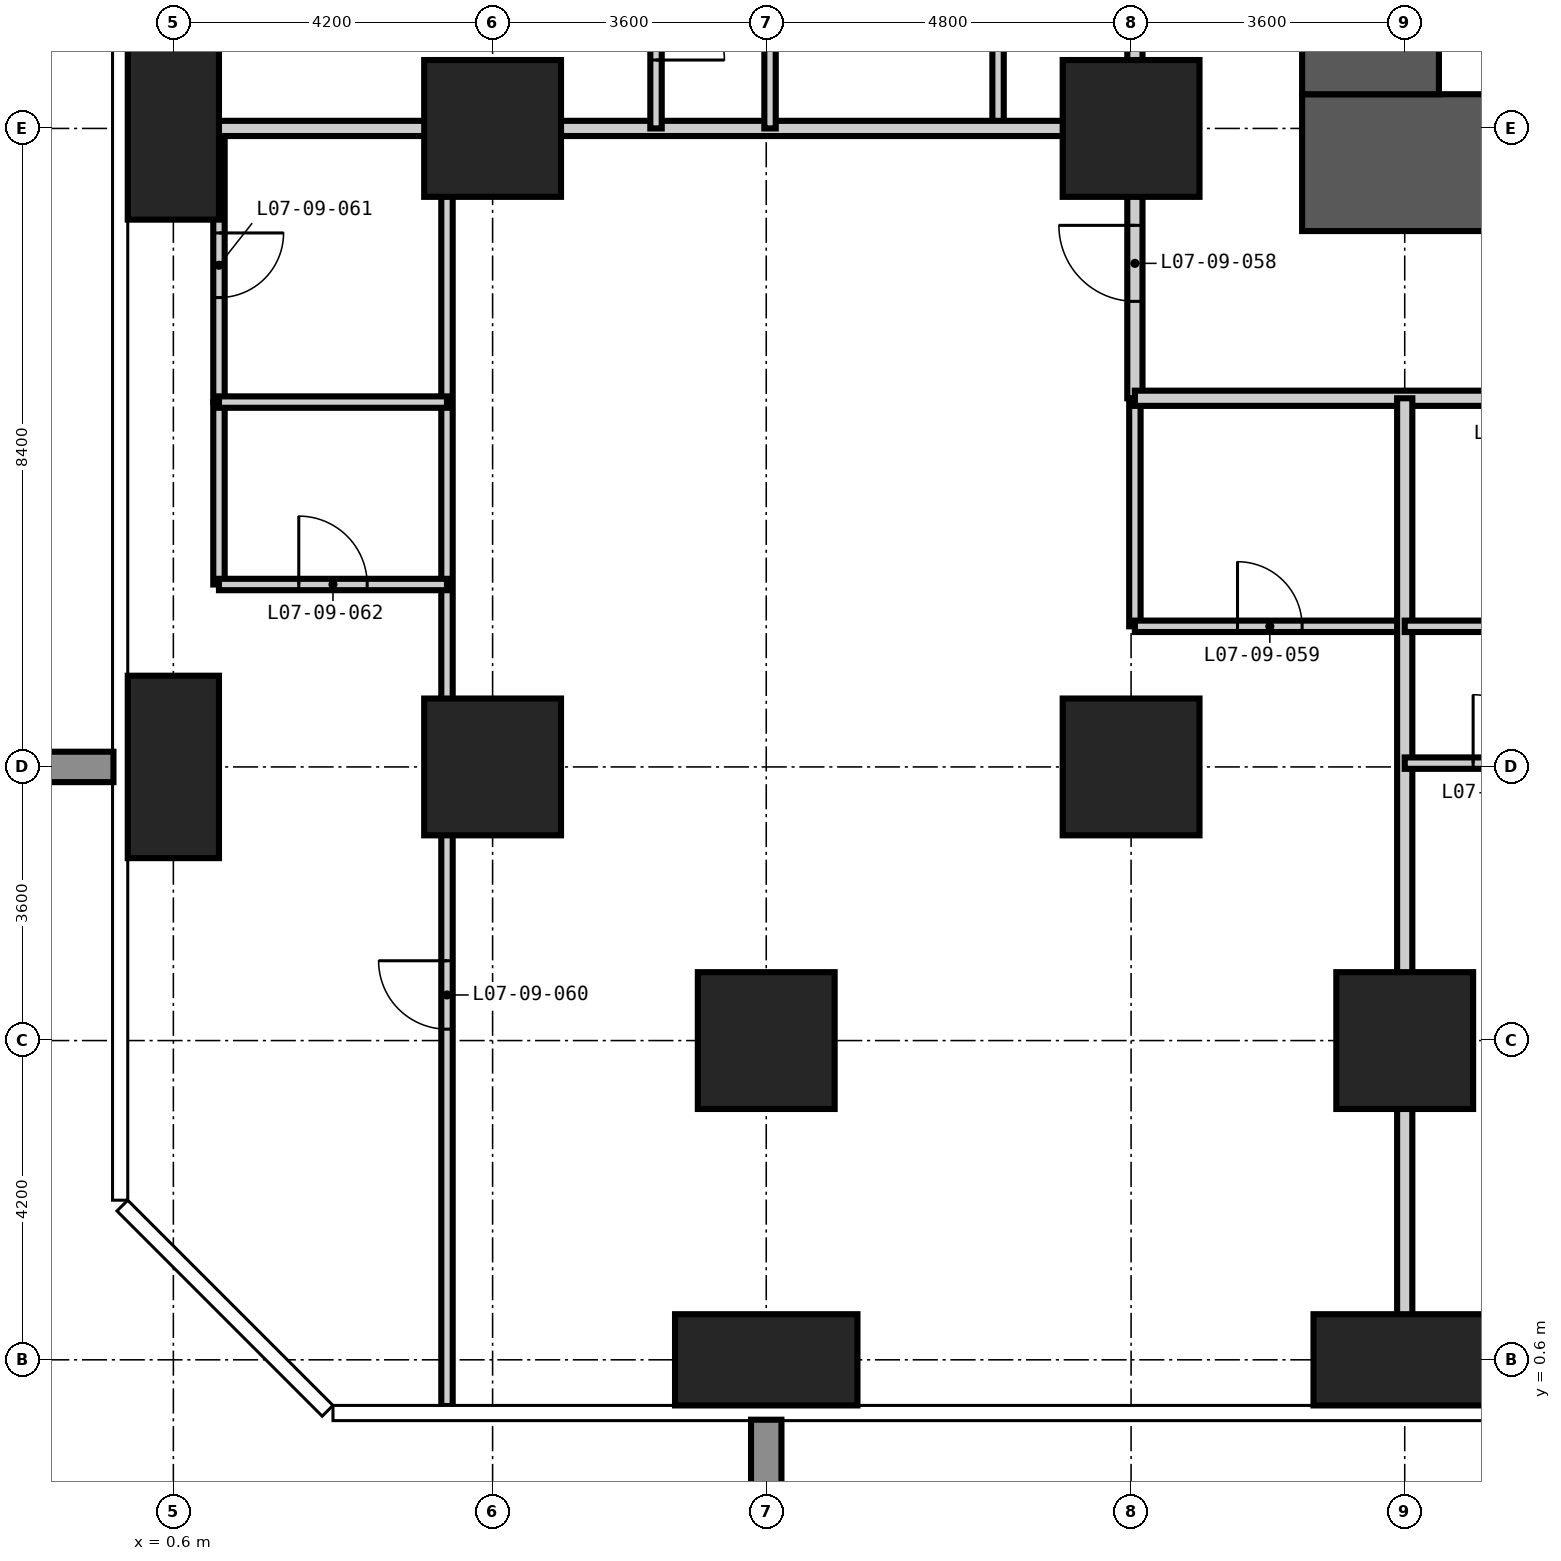
"""IFC4 building model, lengths in metres.
Left out: names, types, materials, properties, quantities, classifications, styles, units other than length and angle.
Written with IfcOpenShell. Run it as: python <this file> out.ifc"""

import sys

from ifc_helpers import new_model, si_unit, direction, frame, frame_2d, origin, origin_2d, place, context, subcontext, project, spatial, rectangle, extrude, element, fill, save


model = new_model("IFC4")
c1 = context("Model", 3, precision=1e-05, world=origin(), true_north=direction((0.0, 1.0)))
c2 = subcontext(c1, "Body", "Model", "MODEL_VIEW")
j1 = project(units=[si_unit("LENGTHUNIT", "METRE"), si_unit("PLANEANGLEUNIT", "RADIAN")], contexts=[c1])
p1 = place(None, origin())
s1 = spatial("IfcSite", under=j1, at=p1, CompositionType="ELEMENT")
p2 = place(p1, origin())
s2 = spatial("IfcBuilding", under=s1, at=p2, CompositionType="ELEMENT")
p3 = place(p2, frame((0.0, 0.0, 34.2)))
s3 = spatial("IfcBuildingStorey", under=s2, at=p3, CompositionType="ELEMENT", Elevation=34.2)
for number, where, z_axis, x_axis in (
    (1, (0.6, 8.4, -0.35), (0.0, 0.0, 1.0), (1.0, 0.0, 0.0)),
    (2, (0.6, 16.8, -0.35), (0.0, 0.0, 1.0), (1.0, 0.0, 0.0)),
):
    element("IfcColumn", number, at=place(p3, frame(where, z_axis=z_axis, x_axis=x_axis)), inside=s3, PredefinedType="COLUMN", context=c2, shape_type="SweptSolid", body=[
        extrude(rectangle(XDim=1.2, YDim=2.4, at=origin_2d()), origin(), (0.0, 0.0, 1.0), 3.6),
    ])
for number, where, z_axis, x_axis in (
    (3, (4.8, 8.4, -0.35), (0.0, 0.0, 1.0), (1.0, 0.0, 0.0)),
    (4, (4.8, 16.8, -0.35), (0.0, 0.0, 1.0), (1.0, 0.0, 0.0)),
):
    element("IfcColumn", number, at=place(p3, frame(where, z_axis=z_axis, x_axis=x_axis)), inside=s3, PredefinedType="COLUMN", context=c2, shape_type="SweptSolid", body=[
        extrude(rectangle(XDim=1.8, YDim=1.8, at=origin_2d()), origin(), (0.0, 0.0, 1.0), 3.6),
    ])
p4 = place(p3, frame((8.4, 0.6, -0.35), z_axis=(0.0, 0.0, 1.0), x_axis=(1.0, 0.0, 0.0)))
e5 = element("IfcColumn", 5, at=p4, inside=s3, PredefinedType="COLUMN", context=c2, shape_type="SweptSolid", body=[
    extrude(rectangle(XDim=2.4, YDim=1.2, at=origin_2d()), origin(), (0.0, 0.0, 1.0), 3.6),
])
for number, where, z_axis, x_axis in (
    (6, (8.4, 4.8, -0.35), (0.0, 0.0, 1.0), (1.0, 0.0, 0.0)),
    (7, (13.2, 8.4, -0.35), (0.0, 0.0, 1.0), (1.0, 0.0, 0.0)),
    (8, (13.2, 16.8, -0.35), (0.0, 0.0, 1.0), (1.0, 0.0, 0.0)),
):
    element("IfcColumn", number, at=place(p3, frame(where, z_axis=z_axis, x_axis=x_axis)), inside=s3, PredefinedType="COLUMN", context=c2, shape_type="SweptSolid", body=[
        extrude(rectangle(XDim=1.8, YDim=1.8, at=origin_2d()), origin(), (0.0, 0.0, 1.0), 3.6),
    ])
p5 = place(p3, frame((16.8, 0.6, -0.35), z_axis=(0.0, 0.0, 1.0), x_axis=(1.0, 0.0, 0.0)))
e9 = element("IfcColumn", 9, at=p5, inside=s3, PredefinedType="COLUMN", context=c2, shape_type="SweptSolid", body=[
    extrude(rectangle(XDim=2.4, YDim=1.2, at=origin_2d()), origin(), (0.0, 0.0, 1.0), 3.6),
])
p6 = place(p3, frame((16.8, 4.8, -0.35), z_axis=(0.0, 0.0, 1.0), x_axis=(1.0, 0.0, 0.0)))
e10 = element("IfcColumn", 10, at=p6, inside=s3, PredefinedType="COLUMN", context=c2, shape_type="SweptSolid", body=[
    extrude(rectangle(XDim=1.8, YDim=1.8, at=origin_2d()), origin(), (0.0, 0.0, 1.0), 3.6),
])
p7 = place(p3, frame((15.45, 16.35, -0.35), z_axis=(0.0, 0.0, 1.0), x_axis=(1.0, 0.0, 0.0)))
e11 = element("IfcWall", 11, at=p7, inside=s3, PredefinedType="SHEAR", context=c2, shape_type="SweptSolid", body=[
    extrude(rectangle(XDim=27.9, YDim=1.8, at=frame_2d((13.95, 0.0))), origin(), (0.0, 0.0, 1.0), 3.6),
])
p8 = place(p7, frame((13.45, 0.0, 0.35)))
e12 = element("IfcOpeningElement", 12, at=p8, cuts=e11, PredefinedType="OPENING", context=c2, shape_type="SweptSolid", body=[
    extrude(rectangle(XDim=1.0, YDim=2.1, at=frame_2d((0.5, 1.05))), frame((0.0, 0.91, 0.0), z_axis=(0.0, -1.0, 0.0), x_axis=(1.0, 0.0, 0.0)), (0.0, 0.0, 1.0), 1.82),
])
p9 = place(p7, frame((19.75, 0.0, 0.35)))
e13 = element("IfcOpeningElement", 13, at=p9, cuts=e11, PredefinedType="OPENING", context=c2, shape_type="SweptSolid", body=[
    extrude(rectangle(XDim=1.0, YDim=2.1, at=frame_2d((0.5, 1.05))), frame((0.0, 0.91, 0.0), z_axis=(0.0, -1.0, 0.0), x_axis=(1.0, 0.0, 0.0)), (0.0, 0.0, 1.0), 1.82),
])
p10 = place(p3, frame((16.35, 41.55, -0.35), z_axis=(0.0, 0.0, 1.0), x_axis=(0.0, -1.0, 0.0)))
e14 = element("IfcWall", 14, at=p10, inside=s3, PredefinedType="SHEAR", context=c2, shape_type="SweptSolid", body=[
    extrude(rectangle(XDim=24.3, YDim=1.8, at=frame_2d((12.15, 0.0))), origin(), (0.0, 0.0, 1.0), 3.6),
])
p11 = place(p10, frame((11.25, 0.0, 0.35)))
e15 = element("IfcOpeningElement", 15, at=p11, cuts=e14, PredefinedType="OPENING", context=c2, shape_type="SweptSolid", body=[
    extrude(rectangle(XDim=1.8, YDim=2.2, at=frame_2d((0.9, 1.1))), frame((0.0, 0.91, 0.0), z_axis=(0.0, -1.0, 0.0), x_axis=(1.0, 0.0, 0.0)), (0.0, 0.0, 1.0), 1.82),
])
p12 = place(p10, frame((20.05, 0.0, 0.35)))
e16 = element("IfcOpeningElement", 16, at=p12, cuts=e14, PredefinedType="OPENING", context=c2, shape_type="SweptSolid", body=[
    extrude(rectangle(XDim=1.0, YDim=2.1, at=frame_2d((0.5, 1.05))), frame((0.0, 0.91, 0.0), z_axis=(0.0, -1.0, 0.0), x_axis=(1.0, 0.0, 0.0)), (0.0, 0.0, 1.0), 1.82),
])
p13 = place(p10, frame((5.35, 0.0, 0.35)))
e17 = element("IfcOpeningElement", 17, at=p13, cuts=e14, PredefinedType="OPENING", context=c2, shape_type="SweptSolid", body=[
    extrude(rectangle(XDim=1.0, YDim=2.1, at=frame_2d((0.5, 1.05))), frame((0.0, 0.91, 0.0), z_axis=(0.0, -1.0, 0.0), x_axis=(1.0, 0.0, 0.0)), (0.0, 0.0, 1.0), 1.82),
])
p14 = place(p3, frame((1.2, 13.2, 0.0), z_axis=(0.0, 0.0, 1.0), x_axis=(0.0, 1.0, 0.0)))
e18 = element("IfcWall", 18, at=p14, inside=s3, PredefinedType="PARTITIONING", context=c2, shape_type="SweptSolid", body=[
    extrude(rectangle(XDim=3.6, YDim=0.15, at=frame_2d((1.8, 0.0))), origin(), (0.0, 0.0, 1.0), 3.25),
])
p15 = place(p14, frame((1.375, 0.0, 0.0)))
e19 = element("IfcOpeningElement", 19, at=p15, cuts=e18, PredefinedType="OPENING", context=c2, shape_type="SweptSolid", body=[
    extrude(rectangle(XDim=0.85, YDim=2.1, at=frame_2d((0.425, 1.05))), frame((0.0, 0.085, 0.0), z_axis=(0.0, -1.0, 0.0), x_axis=(1.0, 0.0, 0.0)), (0.0, 0.0, 1.0), 0.17),
])
p16 = place(p3, frame((11.45, 16.8, 0.0), z_axis=(0.0, 0.0, 1.0), x_axis=(0.0, 1.0, 0.0)))
e20 = element("IfcWall", 20, at=p16, inside=s3, PredefinedType="PARTITIONING", context=c2, shape_type="SweptSolid", body=[
    extrude(rectangle(XDim=2.7, YDim=0.15, at=frame_2d((1.35, 0.0))), origin(), (0.0, 0.0, 1.0), 3.25),
])
p17 = place(p3, frame((13.25, 10.25, 0.0), z_axis=(0.0, 0.0, 1.0), x_axis=(0.0, 1.0, 0.0)))
e21 = element("IfcWall", 21, at=p17, inside=s3, PredefinedType="PARTITIONING", context=c2, shape_type="SweptSolid", body=[
    extrude(rectangle(XDim=3.0, YDim=0.15, at=frame_2d((1.5, 0.0))), origin(), (0.0, 0.0, 1.0), 3.25),
])
p18 = place(p3, frame((13.25, 10.25, 0.0), z_axis=(0.0, 0.0, 1.0), x_axis=(1.0, 0.0, 0.0)))
e22 = element("IfcWall", 22, at=p18, inside=s3, PredefinedType="PARTITIONING", context=c2, shape_type="SweptSolid", body=[
    extrude(rectangle(XDim=3.55, YDim=0.15, at=frame_2d((1.775, 0.0))), origin(), (0.0, 0.0, 1.0), 3.25),
])
p19 = place(p18, frame((1.35, 0.0, 0.0)))
e23 = element("IfcOpeningElement", 23, at=p19, cuts=e22, PredefinedType="OPENING", context=c2, shape_type="SweptSolid", body=[
    extrude(rectangle(XDim=0.85, YDim=2.1, at=frame_2d((0.425, 1.05))), frame((0.0, 0.085, 0.0), z_axis=(0.0, -1.0, 0.0), x_axis=(1.0, 0.0, 0.0)), (0.0, 0.0, 1.0), 0.17),
])
p20 = place(p3, frame((13.25, 13.25, 0.0), z_axis=(0.0, 0.0, 1.0), x_axis=(0.0, 1.0, 0.0)))
e24 = element("IfcWall", 24, at=p20, inside=s3, PredefinedType="PARTITIONING", context=c2, shape_type="SweptSolid", body=[
    extrude(rectangle(XDim=32.0, YDim=0.2, at=frame_2d((16.0, 0.0))), origin(), (0.0, 0.0, 1.0), 3.25),
])
p21 = place(p20, frame((9.35, 0.0, 0.0)))
e25 = element("IfcOpeningElement", 25, at=p21, cuts=e24, PredefinedType="OPENING", context=c2, shape_type="SweptSolid", body=[
    extrude(rectangle(XDim=1.0, YDim=2.2, at=frame_2d((0.5, 1.1))), frame((0.0, 0.11, 0.0), z_axis=(0.0, -1.0, 0.0), x_axis=(1.0, 0.0, 0.0)), (0.0, 0.0, 1.0), 0.22),
])
p22 = place(p20, frame((16.4, 0.0, 0.0)))
e26 = element("IfcOpeningElement", 26, at=p22, cuts=e24, PredefinedType="OPENING", context=c2, shape_type="SweptSolid", body=[
    extrude(rectangle(XDim=1.0, YDim=2.2, at=frame_2d((0.5, 1.1))), frame((0.0, 0.11, 0.0), z_axis=(0.0, -1.0, 0.0), x_axis=(1.0, 0.0, 0.0)), (0.0, 0.0, 1.0), 0.22),
])
p23 = place(p20, frame((23.3, 0.0, 0.0)))
e27 = element("IfcOpeningElement", 27, at=p23, cuts=e24, PredefinedType="OPENING", context=c2, shape_type="SweptSolid", body=[
    extrude(rectangle(XDim=1.0, YDim=2.2, at=frame_2d((0.5, 1.1))), frame((0.0, 0.11, 0.0), z_axis=(0.0, -1.0, 0.0), x_axis=(1.0, 0.0, 0.0)), (0.0, 0.0, 1.0), 0.22),
])
p24 = place(p20, frame((24.8, 0.0, 0.0)))
e28 = element("IfcOpeningElement", 28, at=p24, cuts=e24, PredefinedType="OPENING", context=c2, shape_type="SweptSolid", body=[
    extrude(rectangle(XDim=1.0, YDim=2.2, at=frame_2d((0.5, 1.1))), frame((0.0, 0.11, 0.0), z_axis=(0.0, -1.0, 0.0), x_axis=(1.0, 0.0, 0.0)), (0.0, 0.0, 1.0), 0.22),
])
p25 = place(p20, frame((1.275, 0.0, 0.0)))
e29 = element("IfcOpeningElement", 29, at=p25, cuts=e24, PredefinedType="OPENING", context=c2, shape_type="SweptSolid", body=[
    extrude(rectangle(XDim=1.0, YDim=2.2, at=frame_2d((0.5, 1.1))), frame((0.0, 0.11, 0.0), z_axis=(0.0, -1.0, 0.0), x_axis=(1.0, 0.0, 0.0)), (0.0, 0.0, 1.0), 0.22),
])
p26 = place(p20, frame((29.875, 0.0, 0.0)))
e30 = element("IfcOpeningElement", 30, at=p26, cuts=e24, PredefinedType="OPENING", context=c2, shape_type="SweptSolid", body=[
    extrude(rectangle(XDim=1.0, YDim=2.2, at=frame_2d((0.5, 1.1))), frame((0.0, 0.11, 0.0), z_axis=(0.0, -1.0, 0.0), x_axis=(1.0, 0.0, 0.0)), (0.0, 0.0, 1.0), 0.22),
])
p27 = place(p3, frame((45.85, 13.25, 0.0), z_axis=(0.0, 0.0, 1.0), x_axis=(-1.0, 0.0, 0.0)))
e31 = element("IfcWall", 31, at=p27, inside=s3, PredefinedType="PARTITIONING", context=c2, shape_type="SweptSolid", body=[
    extrude(rectangle(XDim=32.6, YDim=0.2, at=frame_2d((16.3, 0.0))), origin(), (0.0, 0.0, 1.0), 3.25),
])
p28 = place(p27, frame((25.1, 0.0, 0.0)))
e32 = element("IfcOpeningElement", 32, at=p28, cuts=e31, PredefinedType="OPENING", context=c2, shape_type="SweptSolid", body=[
    extrude(rectangle(XDim=1.0, YDim=2.2, at=frame_2d((0.5, 1.1))), frame((0.0, 0.11, 0.0), z_axis=(0.0, -1.0, 0.0), x_axis=(1.0, 0.0, 0.0)), (0.0, 0.0, 1.0), 0.22),
])
p29 = place(p27, frame((21.65, 0.0, 0.0)))
e33 = element("IfcOpeningElement", 33, at=p29, cuts=e31, PredefinedType="OPENING", context=c2, shape_type="SweptSolid", body=[
    extrude(rectangle(XDim=1.0, YDim=2.2, at=frame_2d((0.5, 1.1))), frame((0.0, 0.11, 0.0), z_axis=(0.0, -1.0, 0.0), x_axis=(1.0, 0.0, 0.0)), (0.0, 0.0, 1.0), 0.22),
])
p30 = place(p27, frame((11.75, 0.0, 0.0)))
e34 = element("IfcOpeningElement", 34, at=p30, cuts=e31, PredefinedType="OPENING", context=c2, shape_type="SweptSolid", body=[
    extrude(rectangle(XDim=1.0, YDim=2.2, at=frame_2d((0.5, 1.1))), frame((0.0, 0.11, 0.0), z_axis=(0.0, -1.0, 0.0), x_axis=(1.0, 0.0, 0.0)), (0.0, 0.0, 1.0), 0.22),
])
p31 = place(p27, frame((6.8, 0.0, 0.0)))
e35 = element("IfcOpeningElement", 35, at=p31, cuts=e31, PredefinedType="OPENING", context=c2, shape_type="SweptSolid", body=[
    extrude(rectangle(XDim=1.0, YDim=2.2, at=frame_2d((0.5, 1.1))), frame((0.0, 0.11, 0.0), z_axis=(0.0, -1.0, 0.0), x_axis=(1.0, 0.0, 0.0)), (0.0, 0.0, 1.0), 0.22),
])
for number, where, z_axis, x_axis in (
    (36, (16.8, -0.008, 0.0), (0.0, 0.0, 1.0), (0.0, 1.0, 0.0)),
    (37, (-0.008, 16.8, 0.0), (0.0, 0.0, 1.0), (1.0, 0.0, 0.0)),
):
    element("IfcWall", number, at=place(p3, frame(where, z_axis=z_axis, x_axis=x_axis)), inside=s3, PredefinedType="PARTITIONING", context=c2, shape_type="SweptSolid", body=[
        extrude(rectangle(XDim=13.258, YDim=0.2, at=frame_2d((6.629, 0.0))), origin(), (0.0, 0.0, 1.0), 3.25),
    ])
p32 = place(p3, frame((1.2, 10.8, 0.0), z_axis=(0.0, 0.0, 1.0), x_axis=(0.0, 1.0, 0.0)))
e38 = element("IfcWall", 38, at=p32, inside=s3, PredefinedType="PARTITIONING", context=c2, shape_type="SweptSolid", body=[
    extrude(rectangle(XDim=2.4, YDim=0.15, at=frame_2d((1.2, 0.0))), origin(), (0.0, 0.0, 1.0), 3.25),
])
p33 = place(p3, frame((4.2, -0.008, 0.0), z_axis=(0.0, 0.0, 1.0), x_axis=(0.0, 1.0, 0.0)))
e39 = element("IfcWall", 39, at=p33, inside=s3, PredefinedType="PARTITIONING", context=c2, shape_type="SweptSolid", body=[
    extrude(rectangle(XDim=16.808, YDim=0.15, at=frame_2d((8.404, 0.0))), origin(), (0.0, 0.0, 1.0), 3.25),
])
p34 = place(p33, frame((4.958, 0.0, 0.0)))
e40 = element("IfcOpeningElement", 40, at=p34, cuts=e39, PredefinedType="OPENING", context=c2, shape_type="SweptSolid", body=[
    extrude(rectangle(XDim=0.9, YDim=2.1, at=frame_2d((0.45, 1.05))), frame((0.0, 0.085, 0.0), z_axis=(0.0, -1.0, 0.0), x_axis=(1.0, 0.0, 0.0)), (0.0, 0.0, 1.0), 0.17),
])
p35 = place(p3, frame((6.95, 16.8, 0.0), z_axis=(0.0, 0.0, 1.0), x_axis=(0.0, 1.0, 0.0)))
e41 = element("IfcWall", 41, at=p35, inside=s3, PredefinedType="PARTITIONING", context=c2, shape_type="SweptSolid", body=[
    extrude(rectangle(XDim=2.7, YDim=0.15, at=frame_2d((1.35, 0.0))), origin(), (0.0, 0.0, 1.0), 3.25),
])
p36 = place(p35, frame((0.9, 0.0, 0.0)))
e42 = element("IfcOpeningElement", 42, at=p36, cuts=e41, PredefinedType="OPENING", context=c2, shape_type="SweptSolid", body=[
    extrude(rectangle(XDim=0.9, YDim=2.1, at=frame_2d((0.45, 1.05))), frame((0.0, 0.085, 0.0), z_axis=(0.0, -1.0, 0.0), x_axis=(1.0, 0.0, 0.0)), (0.0, 0.0, 1.0), 0.17),
])
p37 = place(p3, frame((8.45, 16.8, 0.0), z_axis=(0.0, 0.0, 1.0), x_axis=(0.0, 1.0, 0.0)))
e43 = element("IfcWall", 43, at=p37, inside=s3, PredefinedType="PARTITIONING", context=c2, shape_type="SweptSolid", body=[
    extrude(rectangle(XDim=2.7, YDim=0.15, at=frame_2d((1.35, 0.0))), origin(), (0.0, 0.0, 1.0), 3.25),
])
p38 = place(p3, frame((16.8, 8.45, 0.0), z_axis=(0.0, 0.0, 1.0), x_axis=(1.0, 0.0, 0.0)))
e44 = element("IfcWall", 44, at=p38, inside=s3, PredefinedType="PARTITIONING", context=c2, shape_type="SweptSolid", body=[
    extrude(rectangle(XDim=2.7, YDim=0.15, at=frame_2d((1.35, 0.0))), origin(), (0.0, 0.0, 1.0), 3.25),
])
p39 = place(p38, frame((0.9, 0.0, 0.0)))
e45 = element("IfcOpeningElement", 45, at=p39, cuts=e44, PredefinedType="OPENING", context=c2, shape_type="SweptSolid", body=[
    extrude(rectangle(XDim=0.9, YDim=2.1, at=frame_2d((0.45, 1.05))), frame((0.0, 0.085, 0.0), z_axis=(0.0, -1.0, 0.0), x_axis=(1.0, 0.0, 0.0)), (0.0, 0.0, 1.0), 0.17),
])
p40 = place(p3, frame((16.8, 10.25, 0.0), z_axis=(0.0, 0.0, 1.0), x_axis=(1.0, 0.0, 0.0)))
e46 = element("IfcWall", 46, at=p40, inside=s3, PredefinedType="PARTITIONING", context=c2, shape_type="SweptSolid", body=[
    extrude(rectangle(XDim=2.7, YDim=0.15, at=frame_2d((1.35, 0.0))), origin(), (0.0, 0.0, 1.0), 3.25),
])
p41 = place(p3, frame((1.2, 10.8, 0.0), z_axis=(0.0, 0.0, 1.0), x_axis=(1.0, 0.0, 0.0)))
e47 = element("IfcWall", 47, at=p41, inside=s3, PredefinedType="PARTITIONING", context=c2, shape_type="SweptSolid", body=[
    extrude(rectangle(XDim=3.0, YDim=0.15, at=frame_2d((1.5, 0.0))), origin(), (0.0, 0.0, 1.0), 3.25),
])
p42 = place(p41, frame((1.05, 0.0, 0.0)))
e48 = element("IfcOpeningElement", 48, at=p42, cuts=e47, PredefinedType="OPENING", context=c2, shape_type="SweptSolid", body=[
    extrude(rectangle(XDim=0.9, YDim=2.1, at=frame_2d((0.45, 1.05))), frame((0.0, 0.085, 0.0), z_axis=(0.0, -1.0, 0.0), x_axis=(1.0, 0.0, 0.0)), (0.0, 0.0, 1.0), 0.17),
])
p43 = place(p3, frame((1.2, 13.2, 0.0), z_axis=(0.0, 0.0, 1.0), x_axis=(1.0, 0.0, 0.0)))
e49 = element("IfcWall", 49, at=p43, inside=s3, PredefinedType="PARTITIONING", context=c2, shape_type="SweptSolid", body=[
    extrude(rectangle(XDim=3.0, YDim=0.15, at=frame_2d((1.5, 0.0))), origin(), (0.0, 0.0, 1.0), 3.25),
])
p44 = place(p39, origin())
e50 = element("IfcDoor", 50, at=p44, inside=s3, OperationType="SINGLE_SWING_LEFT", PredefinedType="DOOR", context=c2, shape_type="SweptSolid", body=[
    extrude(rectangle(XDim=0.9, YDim=2.1, at=frame_2d((0.45, 1.05))), frame((0.0, 0.025, 0.0), z_axis=(0.0, -1.0, 0.0), x_axis=(1.0, 0.0, 0.0)), (0.0, 0.0, 1.0), 0.05),
])
fill(e45, e50)
p45 = place(p36, frame((0.9, 0.0, 0.0), z_axis=(0.0, 0.0, 1.0), x_axis=(-1.0, 0.0, 0.0)))
e51 = element("IfcDoor", 51, at=p45, inside=s3, OperationType="SINGLE_SWING_RIGHT", PredefinedType="DOOR", context=c2, shape_type="SweptSolid", body=[
    extrude(rectangle(XDim=0.9, YDim=2.1, at=frame_2d((0.45, 1.05))), frame((0.0, 0.025, 0.0), z_axis=(0.0, -1.0, 0.0), x_axis=(1.0, 0.0, 0.0)), (0.0, 0.0, 1.0), 0.05),
])
fill(e42, e51)
p46 = place(p25, origin())
e52 = element("IfcDoor", 52, at=p46, inside=s3, OperationType="SINGLE_SWING_RIGHT", PredefinedType="DOOR", context=c2, shape_type="SweptSolid", body=[
    extrude(rectangle(XDim=1.0, YDim=2.2, at=frame_2d((0.5, 1.1))), frame((0.0, 0.025, 0.0), z_axis=(0.0, -1.0, 0.0), x_axis=(1.0, 0.0, 0.0)), (0.0, 0.0, 1.0), 0.05),
])
fill(e29, e52)
p47 = place(p19, origin())
e53 = element("IfcDoor", 53, at=p47, inside=s3, OperationType="SINGLE_SWING_LEFT", PredefinedType="DOOR", context=c2, shape_type="SweptSolid", body=[
    extrude(rectangle(XDim=0.85, YDim=2.1, at=frame_2d((0.425, 1.05))), frame((0.0, 0.025, 0.0), z_axis=(0.0, -1.0, 0.0), x_axis=(1.0, 0.0, 0.0)), (0.0, 0.0, 1.0), 0.05),
])
fill(e23, e53)
p48 = place(p34, origin())
e54 = element("IfcDoor", 54, at=p48, inside=s3, OperationType="SINGLE_SWING_RIGHT", PredefinedType="DOOR", context=c2, shape_type="SweptSolid", body=[
    extrude(rectangle(XDim=0.9, YDim=2.1, at=frame_2d((0.45, 1.05))), frame((0.0, 0.025, 0.0), z_axis=(0.0, -1.0, 0.0), x_axis=(1.0, 0.0, 0.0)), (0.0, 0.0, 1.0), 0.05),
])
fill(e40, e54)
p49 = place(p15, frame((0.85, 0.0, 0.0), z_axis=(0.0, 0.0, 1.0), x_axis=(-1.0, 0.0, 0.0)))
e55 = element("IfcDoor", 55, at=p49, inside=s3, OperationType="SINGLE_SWING_LEFT", PredefinedType="DOOR", context=c2, shape_type="SweptSolid", body=[
    extrude(rectangle(XDim=0.85, YDim=2.1, at=frame_2d((0.425, 1.05))), frame((0.0, 0.025, 0.0), z_axis=(0.0, -1.0, 0.0), x_axis=(1.0, 0.0, 0.0)), (0.0, 0.0, 1.0), 0.05),
])
fill(e19, e55)
p50 = place(p42, origin())
e56 = element("IfcDoor", 56, at=p50, inside=s3, OperationType="SINGLE_SWING_LEFT", PredefinedType="DOOR", context=c2, shape_type="SweptSolid", body=[
    extrude(rectangle(XDim=0.9, YDim=2.1, at=frame_2d((0.45, 1.05))), frame((0.0, 0.025, 0.0), z_axis=(0.0, -1.0, 0.0), x_axis=(1.0, 0.0, 0.0)), (0.0, 0.0, 1.0), 0.05),
])
fill(e48, e56)
save(model, sys.argv[1])
